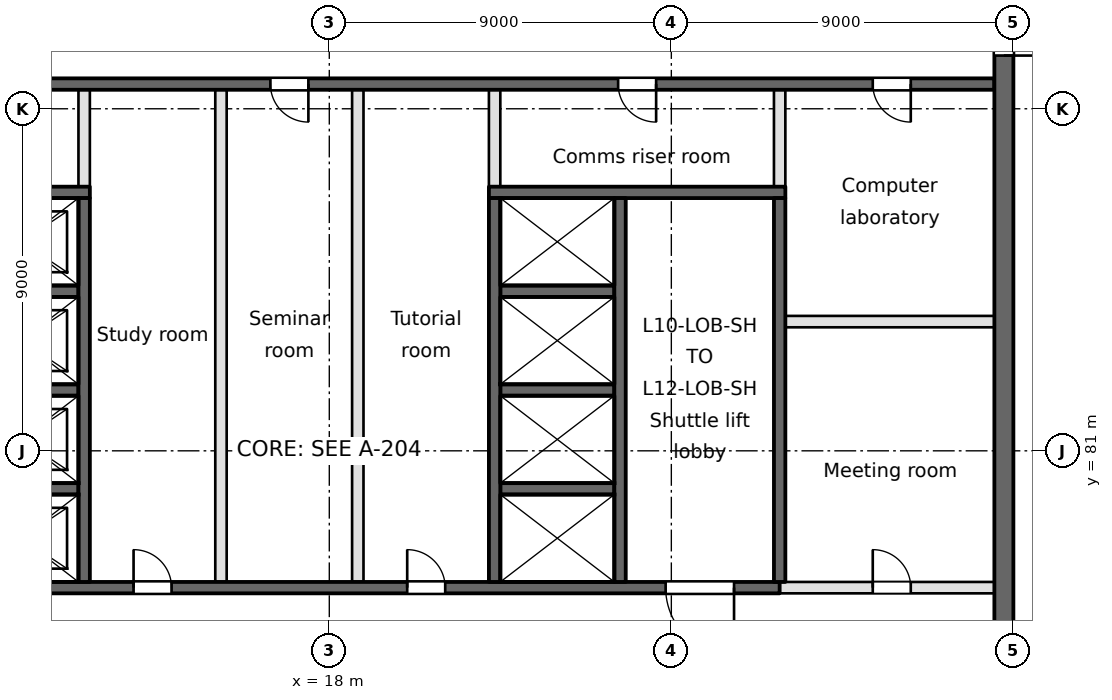
"""IFC4 building model, lengths in metres.
Left out: names, types, materials, properties, quantities, classifications, styles, units other than length and angle.
Written with IfcOpenShell. Run it as: python <this file> out.ifc"""

import sys

from ifc_helpers import new_model, si_unit, direction, frame, frame_2d, origin, place, context, subcontext, project, spatial, rectangle, extrude, element, fill, save


model = new_model("IFC4")
c1 = context("Model", 3, precision=1e-05, world=origin(), true_north=direction((0.0, 1.0)))
c2 = subcontext(c1, "Body", "Model", "MODEL_VIEW")
j1 = project(units=[si_unit("LENGTHUNIT", "METRE"), si_unit("PLANEANGLEUNIT", "RADIAN")], contexts=[c1])
p1 = place(None, origin())
s1 = spatial("IfcSite", under=j1, at=p1, CompositionType="ELEMENT")
p2 = place(p1, origin())
s2 = spatial("IfcBuilding", under=s1, at=p2, CompositionType="ELEMENT")
p3 = place(p2, frame((0.0, 0.0, 46.9)))
s3 = spatial("IfcBuildingStorey", under=s2, at=p3, CompositionType="ELEMENT", Elevation=46.9)
p4 = place(p3, frame((0.9, 77.4, -0.4), z_axis=(0.0, 0.0, 1.0), x_axis=(1.0, 0.0, 0.0)))
e1 = element("IfcWall", 1, at=p4, inside=s3, PredefinedType="SOLIDWALL", context=c2, shape_type="SweptSolid", body=[
    extrude(rectangle(XDim=28.95, YDim=0.3, at=frame_2d((14.475, 0.0))), origin(), (0.0, 0.0, 1.0), 3.7),
])
p5 = place(p4, frame((4.35, 0.0, 0.4)))
e2 = element("IfcOpeningElement", 2, at=p5, cuts=e1, PredefinedType="OPENING", context=c2, shape_type="SweptSolid", body=[
    extrude(rectangle(XDim=1.8, YDim=2.1, at=frame_2d((0.9, 1.05))), frame((0.0, 0.15, 0.0), z_axis=(0.0, -1.0, 0.0), x_axis=(1.0, 0.0, 0.0)), (0.0, 0.0, 1.0), 0.3),
])
p6 = place(p4, frame((25.95, 0.0, 0.4)))
e3 = element("IfcOpeningElement", 3, at=p6, cuts=e1, PredefinedType="OPENING", context=c2, shape_type="SweptSolid", body=[
    extrude(rectangle(XDim=1.8, YDim=2.1, at=frame_2d((0.9, 1.05))), frame((0.0, 0.15, 0.0), z_axis=(0.0, -1.0, 0.0), x_axis=(1.0, 0.0, 0.0)), (0.0, 0.0, 1.0), 0.3),
])
p7 = place(p4, frame((11.95, 0.0, 0.4)))
e4 = element("IfcOpeningElement", 4, at=p7, cuts=e1, PredefinedType="OPENING", context=c2, shape_type="SweptSolid", body=[
    extrude(rectangle(XDim=1.0, YDim=2.1, at=frame_2d((0.5, 1.05))), frame((0.0, 0.15, 0.0), z_axis=(0.0, -1.0, 0.0), x_axis=(1.0, 0.0, 0.0)), (0.0, 0.0, 1.0), 0.3),
])
p8 = place(p4, frame((19.15, 0.0, 0.4)))
e5 = element("IfcOpeningElement", 5, at=p8, cuts=e1, PredefinedType="OPENING", context=c2, shape_type="SweptSolid", body=[
    extrude(rectangle(XDim=1.0, YDim=2.1, at=frame_2d((0.5, 1.05))), frame((0.0, 0.15, 0.0), z_axis=(0.0, -1.0, 0.0), x_axis=(1.0, 0.0, 0.0)), (0.0, 0.0, 1.0), 0.3),
])
p9 = place(p3, frame((29.85, 77.4, 0.0), z_axis=(0.0, 0.0, 1.0), x_axis=(1.0, 0.0, 0.0)))
e6 = element("IfcWall", 6, at=p9, inside=s3, PredefinedType="PARTITIONING", context=c2, shape_type="SweptSolid", body=[
    extrude(rectangle(XDim=5.65, YDim=0.3, at=frame_2d((2.825, 0.0))), origin(), (0.0, 0.0, 1.0), 3.3),
])
p10 = place(p9, frame((2.45, 0.0, 0.0)))
e7 = element("IfcOpeningElement", 7, at=p10, cuts=e6, PredefinedType="OPENING", context=c2, shape_type="SweptSolid", body=[
    extrude(rectangle(XDim=1.0, YDim=2.1, at=frame_2d((0.5, 1.05))), frame((0.0, 0.15, 0.0), z_axis=(0.0, -1.0, 0.0), x_axis=(1.0, 0.0, 0.0)), (0.0, 0.0, 1.0), 0.3),
])
for number, where, z_axis, x_axis in (
    (8, (8.4, 80.0, -0.4), (0.0, 0.0, 1.0), (1.0, 0.0, 0.0)),
    (9, (22.5, 80.0, -0.4), (0.0, 0.0, 1.0), (1.0, 0.0, 0.0)),
    (10, (8.4, 82.6, -0.4), (0.0, 0.0, 1.0), (1.0, 0.0, 0.0)),
    (11, (22.5, 82.6, -0.4), (0.0, 0.0, 1.0), (1.0, 0.0, 0.0)),
):
    element("IfcWall", number, at=place(p3, frame(where, z_axis=z_axis, x_axis=x_axis)), inside=s3, PredefinedType="SOLIDWALL", context=c2, shape_type="SweptSolid", body=[
        extrude(rectangle(XDim=3.0, YDim=0.3, at=frame_2d((1.5, 0.0))), origin(), (0.0, 0.0, 1.0), 3.7),
    ])
p11 = place(p3, frame((30.0, 84.4, 0.0), z_axis=(0.0, 0.0, 1.0), x_axis=(1.0, 0.0, 0.0)))
e12 = element("IfcWall", 12, at=p11, inside=s3, PredefinedType="PARTITIONING", context=c2, shape_type="SweptSolid", body=[
    extrude(rectangle(XDim=5.5, YDim=0.3, at=frame_2d((2.75, 0.0))), origin(), (0.0, 0.0, 1.0), 3.3),
])
for number, where, z_axis, x_axis in (
    (13, (8.4, 85.2, -0.4), (0.0, 0.0, 1.0), (1.0, 0.0, 0.0)),
    (14, (22.5, 85.2, -0.4), (0.0, 0.0, 1.0), (1.0, 0.0, 0.0)),
):
    element("IfcWall", number, at=place(p3, frame(where, z_axis=z_axis, x_axis=x_axis)), inside=s3, PredefinedType="SOLIDWALL", context=c2, shape_type="SweptSolid", body=[
        extrude(rectangle(XDim=3.0, YDim=0.3, at=frame_2d((1.5, 0.0))), origin(), (0.0, 0.0, 1.0), 3.7),
    ])
p12 = place(p3, frame((0.9, 87.8, -0.4), z_axis=(0.0, 0.0, 1.0), x_axis=(1.0, 0.0, 0.0)))
e15 = element("IfcWall", 15, at=p12, inside=s3, PredefinedType="SOLIDWALL", context=c2, shape_type="SweptSolid", body=[
    extrude(rectangle(XDim=10.8, YDim=0.3, at=frame_2d((5.4, 0.0))), origin(), (0.0, 0.0, 1.0), 3.7),
])
p13 = place(p3, frame((22.2, 87.8, -0.4), z_axis=(0.0, 0.0, 1.0), x_axis=(1.0, 0.0, 0.0)))
e16 = element("IfcWall", 16, at=p13, inside=s3, PredefinedType="SOLIDWALL", context=c2, shape_type="SweptSolid", body=[
    extrude(rectangle(XDim=7.8, YDim=0.3, at=frame_2d((3.9, 0.0))), origin(), (0.0, 0.0, 1.0), 3.7),
])
p14 = place(p3, frame((0.9, 90.65, -0.4), z_axis=(0.0, 0.0, 1.0), x_axis=(1.0, 0.0, 0.0)))
e17 = element("IfcWall", 17, at=p14, inside=s3, PredefinedType="SOLIDWALL", context=c2, shape_type="SweptSolid", body=[
    extrude(rectangle(XDim=34.6, YDim=0.3, at=frame_2d((17.3, 0.0))), origin(), (0.0, 0.0, 1.0), 3.7),
])
p15 = place(p14, frame((4.75, 0.0, 0.4)))
e18 = element("IfcOpeningElement", 18, at=p15, cuts=e17, PredefinedType="OPENING", context=c2, shape_type="SweptSolid", body=[
    extrude(rectangle(XDim=1.0, YDim=2.1, at=frame_2d((0.5, 1.05))), frame((0.0, 0.15, 0.0), z_axis=(0.0, -1.0, 0.0), x_axis=(1.0, 0.0, 0.0)), (0.0, 0.0, 1.0), 0.3),
])
p16 = place(p14, frame((24.7, 0.0, 0.4)))
e19 = element("IfcOpeningElement", 19, at=p16, cuts=e17, PredefinedType="OPENING", context=c2, shape_type="SweptSolid", body=[
    extrude(rectangle(XDim=1.0, YDim=2.1, at=frame_2d((0.5, 1.05))), frame((0.0, 0.15, 0.0), z_axis=(0.0, -1.0, 0.0), x_axis=(1.0, 0.0, 0.0)), (0.0, 0.0, 1.0), 0.3),
])
p17 = place(p14, frame((15.55, 0.0, 0.4)))
e20 = element("IfcOpeningElement", 20, at=p17, cuts=e17, PredefinedType="OPENING", context=c2, shape_type="SweptSolid", body=[
    extrude(rectangle(XDim=1.0, YDim=2.1, at=frame_2d((0.5, 1.05))), frame((0.0, 0.15, 0.0), z_axis=(0.0, -1.0, 0.0), x_axis=(1.0, 0.0, 0.0)), (0.0, 0.0, 1.0), 0.3),
])
p18 = place(p14, frame((31.4, 0.0, 0.4)))
e21 = element("IfcOpeningElement", 21, at=p18, cuts=e17, PredefinedType="OPENING", context=c2, shape_type="SweptSolid", body=[
    extrude(rectangle(XDim=1.0, YDim=2.1, at=frame_2d((0.5, 1.05))), frame((0.0, 0.15, 0.0), z_axis=(0.0, -1.0, 0.0), x_axis=(1.0, 0.0, 0.0)), (0.0, 0.0, 1.0), 0.3),
])
p19 = place(p3, frame((11.55, 77.55, -0.4), z_axis=(0.0, 0.0, 1.0), x_axis=(0.0, 1.0, 0.0)))
e22 = element("IfcWall", 22, at=p19, inside=s3, PredefinedType="SOLIDWALL", context=c2, shape_type="SweptSolid", body=[
    extrude(rectangle(XDim=10.1, YDim=0.3, at=frame_2d((5.05, 0.0))), origin(), (0.0, 0.0, 1.0), 3.7),
])
p20 = place(p3, frame((11.55, 87.95, 0.0), z_axis=(0.0, 0.0, 1.0), x_axis=(0.0, 1.0, 0.0)))
e23 = element("IfcWall", 23, at=p20, inside=s3, PredefinedType="PARTITIONING", context=c2, shape_type="SweptSolid", body=[
    extrude(rectangle(XDim=2.55, YDim=0.3, at=frame_2d((1.275, 0.0))), origin(), (0.0, 0.0, 1.0), 3.3),
])
for number, where, z_axis, x_axis in (
    (24, (15.15, 77.55, 0.0), (0.0, 0.0, 1.0), (0.0, 1.0, 0.0)),
    (25, (18.75, 77.55, 0.0), (0.0, 0.0, 1.0), (0.0, 1.0, 0.0)),
):
    element("IfcWall", number, at=place(p3, frame(where, z_axis=z_axis, x_axis=x_axis)), inside=s3, PredefinedType="PARTITIONING", context=c2, shape_type="SweptSolid", body=[
        extrude(rectangle(XDim=12.95, YDim=0.3, at=frame_2d((6.475, 0.0))), origin(), (0.0, 0.0, 1.0), 3.3),
    ])
p21 = place(p3, frame((22.35, 77.55, -0.4), z_axis=(0.0, 0.0, 1.0), x_axis=(0.0, 1.0, 0.0)))
e26 = element("IfcWall", 26, at=p21, inside=s3, PredefinedType="SOLIDWALL", context=c2, shape_type="SweptSolid", body=[
    extrude(rectangle(XDim=10.1, YDim=0.3, at=frame_2d((5.05, 0.0))), origin(), (0.0, 0.0, 1.0), 3.7),
])
p22 = place(p3, frame((22.35, 87.95, 0.0), z_axis=(0.0, 0.0, 1.0), x_axis=(0.0, 1.0, 0.0)))
e27 = element("IfcWall", 27, at=p22, inside=s3, PredefinedType="PARTITIONING", context=c2, shape_type="SweptSolid", body=[
    extrude(rectangle(XDim=2.55, YDim=0.3, at=frame_2d((1.275, 0.0))), origin(), (0.0, 0.0, 1.0), 3.3),
])
for number, where, z_axis, x_axis in (
    (28, (25.65, 77.55, -0.4), (0.0, 0.0, 1.0), (0.0, 1.0, 0.0)),
    (29, (29.85, 77.55, -0.4), (0.0, 0.0, 1.0), (0.0, 1.0, 0.0)),
):
    element("IfcWall", number, at=place(p3, frame(where, z_axis=z_axis, x_axis=x_axis)), inside=s3, PredefinedType="SOLIDWALL", context=c2, shape_type="SweptSolid", body=[
        extrude(rectangle(XDim=10.1, YDim=0.3, at=frame_2d((5.05, 0.0))), origin(), (0.0, 0.0, 1.0), 3.7),
    ])
p23 = place(p3, frame((29.85, 87.95, 0.0), z_axis=(0.0, 0.0, 1.0), x_axis=(0.0, 1.0, 0.0)))
e30 = element("IfcWall", 30, at=p23, inside=s3, PredefinedType="PARTITIONING", context=c2, shape_type="SweptSolid", body=[
    extrude(rectangle(XDim=2.55, YDim=0.3, at=frame_2d((1.275, 0.0))), origin(), (0.0, 0.0, 1.0), 3.3),
])
p24 = place(p3, frame((35.75, 63.5, -0.4), z_axis=(0.0, 0.0, 1.0), x_axis=(0.0, 1.0, 0.0)))
e31 = element("IfcWall", 31, at=p24, inside=s3, PredefinedType="SOLIDWALL", context=c2, shape_type="SweptSolid", body=[
    extrude(rectangle(XDim=34.6, YDim=0.5, at=frame_2d((17.3, 0.0))), origin(), (0.0, 0.0, 1.0), 3.7),
])
p25 = place(p24, frame((9.7, 0.0, 0.4)))
e32 = element("IfcOpeningElement", 32, at=p25, cuts=e31, PredefinedType="OPENING", context=c2, shape_type="SweptSolid", body=[
    extrude(rectangle(XDim=2.4, YDim=2.1, at=frame_2d((1.2, 1.05))), frame((0.0, 0.25, 0.0), z_axis=(0.0, -1.0, 0.0), x_axis=(1.0, 0.0, 0.0)), (0.0, 0.0, 1.0), 0.5),
])
p26 = place(p24, frame((27.9, 0.0, 0.4)))
e33 = element("IfcOpeningElement", 33, at=p26, cuts=e31, PredefinedType="OPENING", context=c2, shape_type="SweptSolid", body=[
    extrude(rectangle(XDim=1.5, YDim=2.1, at=frame_2d((0.75, 1.05))), frame((0.0, 0.25, 0.0), z_axis=(0.0, -1.0, 0.0), x_axis=(1.0, 0.0, 0.0)), (0.0, 0.0, 1.0), 0.5),
])
p27 = place(p24, frame((1.5, 0.0, 0.4)))
e34 = element("IfcOpeningElement", 34, at=p27, cuts=e31, PredefinedType="OPENING", context=c2, shape_type="SweptSolid", body=[
    extrude(rectangle(XDim=1.2, YDim=2.1, at=frame_2d((0.6, 1.05))), frame((0.0, 0.25, 0.0), z_axis=(0.0, -1.0, 0.0), x_axis=(1.0, 0.0, 0.0)), (0.0, 0.0, 1.0), 0.5),
])
p28 = place(p6, frame((1.8, 0.0, 0.0), z_axis=(0.0, 0.0, 1.0), x_axis=(-1.0, 0.0, 0.0)))
e35 = element("IfcDoor", 35, at=p28, inside=s3, OperationType="SINGLE_SWING_LEFT", PredefinedType="DOOR", context=c2, shape_type="SweptSolid", body=[
    extrude(rectangle(XDim=1.8, YDim=2.1, at=frame_2d((0.9, 1.05))), frame((0.0, 0.025, 0.0), z_axis=(0.0, -1.0, 0.0), x_axis=(1.0, 0.0, 0.0)), (0.0, 0.0, 1.0), 0.05),
])
fill(e3, e35)
p29 = place(p26, frame((1.5, 0.0, 0.0), z_axis=(0.0, 0.0, 1.0), x_axis=(-1.0, 0.0, 0.0)))
e36 = element("IfcDoor", 36, at=p29, inside=s3, OperationType="SINGLE_SWING_RIGHT", PredefinedType="DOOR", context=c2, shape_type="SweptSolid", body=[
    extrude(rectangle(XDim=1.5, YDim=2.1, at=frame_2d((0.75, 1.05))), frame((0.0, 0.025, 0.0), z_axis=(0.0, -1.0, 0.0), x_axis=(1.0, 0.0, 0.0)), (0.0, 0.0, 1.0), 0.05),
])
fill(e33, e36)
p30 = place(p16, frame((1.0, 0.0, 0.0), z_axis=(0.0, 0.0, 1.0), x_axis=(-1.0, 0.0, 0.0)))
e37 = element("IfcDoor", 37, at=p30, inside=s3, OperationType="SINGLE_SWING_LEFT", PredefinedType="DOOR", context=c2, shape_type="SweptSolid", body=[
    extrude(rectangle(XDim=1.0, YDim=2.1, at=frame_2d((0.5, 1.05))), frame((0.0, 0.025, 0.0), z_axis=(0.0, -1.0, 0.0), x_axis=(1.0, 0.0, 0.0)), (0.0, 0.0, 1.0), 0.05),
])
fill(e19, e37)
p31 = place(p7, origin())
e38 = element("IfcDoor", 38, at=p31, inside=s3, OperationType="SINGLE_SWING_LEFT", PredefinedType="DOOR", context=c2, shape_type="SweptSolid", body=[
    extrude(rectangle(XDim=1.0, YDim=2.1, at=frame_2d((0.5, 1.05))), frame((0.0, 0.025, 0.0), z_axis=(0.0, -1.0, 0.0), x_axis=(1.0, 0.0, 0.0)), (0.0, 0.0, 1.0), 0.05),
])
fill(e4, e38)
p32 = place(p17, frame((1.0, 0.0, 0.0), z_axis=(0.0, 0.0, 1.0), x_axis=(-1.0, 0.0, 0.0)))
e39 = element("IfcDoor", 39, at=p32, inside=s3, OperationType="SINGLE_SWING_LEFT", PredefinedType="DOOR", context=c2, shape_type="SweptSolid", body=[
    extrude(rectangle(XDim=1.0, YDim=2.1, at=frame_2d((0.5, 1.05))), frame((0.0, 0.025, 0.0), z_axis=(0.0, -1.0, 0.0), x_axis=(1.0, 0.0, 0.0)), (0.0, 0.0, 1.0), 0.05),
])
fill(e20, e39)
p33 = place(p8, origin())
e40 = element("IfcDoor", 40, at=p33, inside=s3, OperationType="SINGLE_SWING_LEFT", PredefinedType="DOOR", context=c2, shape_type="SweptSolid", body=[
    extrude(rectangle(XDim=1.0, YDim=2.1, at=frame_2d((0.5, 1.05))), frame((0.0, 0.025, 0.0), z_axis=(0.0, -1.0, 0.0), x_axis=(1.0, 0.0, 0.0)), (0.0, 0.0, 1.0), 0.05),
])
fill(e5, e40)
p34 = place(p10, origin())
e41 = element("IfcDoor", 41, at=p34, inside=s3, OperationType="SINGLE_SWING_LEFT", PredefinedType="DOOR", context=c2, shape_type="SweptSolid", body=[
    extrude(rectangle(XDim=1.0, YDim=2.1, at=frame_2d((0.5, 1.05))), frame((0.0, 0.025, 0.0), z_axis=(0.0, -1.0, 0.0), x_axis=(1.0, 0.0, 0.0)), (0.0, 0.0, 1.0), 0.05),
])
fill(e7, e41)
p35 = place(p18, frame((1.0, 0.0, 0.0), z_axis=(0.0, 0.0, 1.0), x_axis=(-1.0, 0.0, 0.0)))
e42 = element("IfcDoor", 42, at=p35, inside=s3, OperationType="SINGLE_SWING_LEFT", PredefinedType="DOOR", context=c2, shape_type="SweptSolid", body=[
    extrude(rectangle(XDim=1.0, YDim=2.1, at=frame_2d((0.5, 1.05))), frame((0.0, 0.025, 0.0), z_axis=(0.0, -1.0, 0.0), x_axis=(1.0, 0.0, 0.0)), (0.0, 0.0, 1.0), 0.05),
])
fill(e21, e42)
save(model, sys.argv[1])
